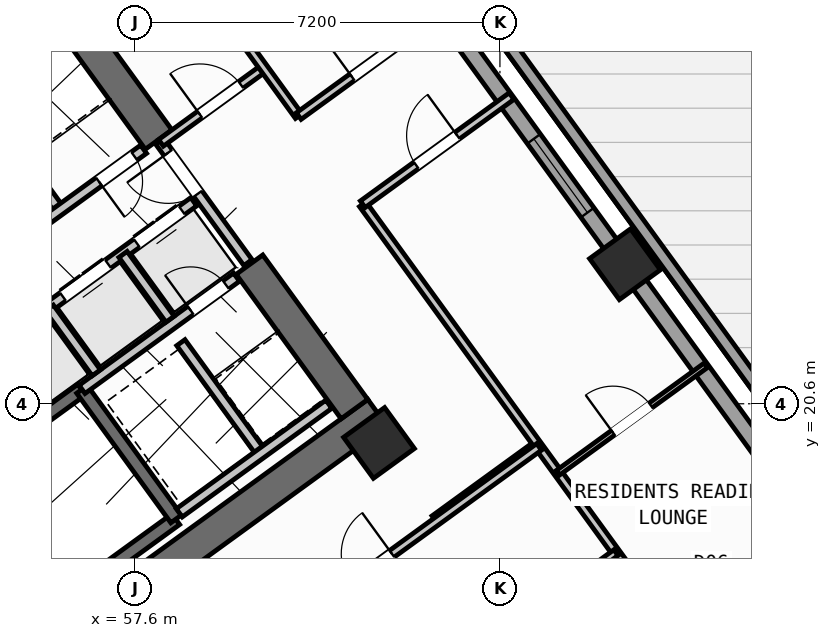
"""IFC4 building model, lengths in metres.
Left out: names, types, materials, properties, quantities, classifications, styles, units other than length and angle.
Written with IfcOpenShell. Run it as: python <this file> out.ifc"""

import sys

from ifc_helpers import new_model, si_unit, direction, frame, frame_2d, origin, origin_2d, place, context, subcontext, project, spatial, rectangle, hollow_rectangle, extrude, source, transform, mapped, element, fill, save


model = new_model("IFC4")
c1 = context("Model", 3, precision=1e-05, world=origin(), true_north=direction((0.0, 1.0)))
c2 = subcontext(c1, "Body", "Model", "MODEL_VIEW")
j1 = project(units=[si_unit("LENGTHUNIT", "METRE"), si_unit("PLANEANGLEUNIT", "RADIAN")], contexts=[c1])
p1 = place(None, origin())
s1 = spatial("IfcSite", under=j1, at=p1, CompositionType="ELEMENT")
p2 = place(p1, origin())
s2 = spatial("IfcBuilding", under=s1, at=p2, CompositionType="ELEMENT")
p3 = place(p2, frame((0.0, 0.0, 24.0)))
s3 = spatial("IfcBuildingStorey", under=s2, at=p3, CompositionType="ELEMENT", Elevation=24.0)
p4 = place(p3, frame((52.318, 13.11, 0.0), z_axis=(0.0, 0.0, 1.0), x_axis=(0.809019445368, 0.587781878776, 0.0)))
e1 = element("IfcWall", 1, at=p4, inside=s3, PredefinedType="SHEAR", context=c2, shape_type="SweptSolid", body=[
    extrude(rectangle(XDim=12.44, YDim=0.65, at=frame_2d((6.22, 0.0))), origin(), (0.0, 0.0, 1.0), 3.35),
])
p5 = place(p3, frame((61.929, 20.494, 0.0), z_axis=(0.0, 0.0, 1.0), x_axis=(-0.58782982593, 0.808984607855, 0.0)))
e2 = element("IfcWall", 2, at=p5, inside=s3, PredefinedType="SHEAR", context=c2, shape_type="SweptSolid", body=[
    extrude(rectangle(XDim=3.525, YDim=0.65, at=frame_2d((1.762, 0.0))), origin(), (0.0, 0.0, 1.0), 3.35),
])
p6 = place(p3, frame((58.064, 25.813, 0.0), z_axis=(0.0, 0.0, 1.0), x_axis=(-0.58777996584, 0.809020835181, 0.0)))
e3 = element("IfcWall", 3, at=p6, inside=s3, PredefinedType="SHEAR", context=c2, shape_type="SweptSolid", body=[
    extrude(rectangle(XDim=6.375, YDim=0.65, at=frame_2d((3.188, 0.0))), origin(), (0.0, 0.0, 1.0), 3.35),
])
m1 = source(origin(), c2, "Body", "SweptSolid", [
    extrude(hollow_rectangle(XDim=1.0, YDim=1.0, WallThickness=0.04, at=origin_2d()), origin(), (0.0, 0.0, 1.0), 3.6),
])
for number, where, z_axis, x_axis in (
    (4, (62.414, 19.827, 0.0), (0.0, 0.0, 1.0), (0.809, 0.588, 0.0)),
    (5, (67.268, 23.354, 0.0), (0.0, 0.0, 1.0), (0.809, 0.588, 0.0)),
):
    element("IfcColumn", number, at=place(p3, frame(where, z_axis=z_axis, x_axis=x_axis)), inside=s3, PredefinedType="COLUMN", context=c2, shape_type="MappedRepresentation", body=[
        mapped(m1, transform((0.0, 0.0, 0.0), scale=1.0)),
    ])
p7 = place(p3, frame((70.18, 20.52, 0.0), z_axis=(0.0, 0.0, 1.0), x_axis=(-0.587784691012, 0.809017402169, 0.0)))
e6 = element("IfcWall", 6, at=p7, inside=s3, PredefinedType="PARAPET", context=c2, shape_type="SweptSolid", body=[
    extrude(rectangle(XDim=18.608, YDim=0.24, at=frame_2d((9.304, 0.0))), origin(), (0.0, 0.0, 1.0), 1.15),
])
p8 = place(p3, frame((43.938, 25.192, 0.0), z_axis=(0.0, 0.0, 1.0), x_axis=(0.809016324578, 0.587786174187, 0.0)))
e7 = element("IfcWall", 7, at=p8, inside=s3, PredefinedType="STANDARD", context=c2, shape_type="SweptSolid", body=[
    extrude(rectangle(XDim=17.587, YDim=0.32, at=frame_2d((8.794, 0.0))), origin(), (0.0, 0.0, 1.0), 3.35),
])
p9 = place(p8, frame((14.914, 0.0, 0.0)))
e8 = element("IfcOpeningElement", 8, at=p9, cuts=e7, PredefinedType="OPENING", context=c2, shape_type="SweptSolid", body=[
    extrude(rectangle(XDim=1.05, YDim=2.15, at=frame_2d((0.525, 1.075))), frame((0.0, 0.17, 0.0), z_axis=(0.0, -1.0, 0.0), x_axis=(1.0, 0.0, 0.0)), (0.0, 0.0, 1.0), 0.34),
])
p10 = place(p8, frame((2.169, 0.0, 0.8)))
e9 = element("IfcOpeningElement", 9, at=p10, cuts=e7, PredefinedType="OPENING", context=c2, shape_type="SweptSolid", body=[
    extrude(rectangle(XDim=2.1, YDim=1.55, at=frame_2d((1.05, 0.775))), frame((0.0, 0.17, 0.0), z_axis=(0.0, -1.0, 0.0), x_axis=(1.0, 0.0, 0.0)), (0.0, 0.0, 1.0), 0.34),
])
p11 = place(p8, frame((7.319, 0.0, 0.8)))
e10 = element("IfcOpeningElement", 10, at=p11, cuts=e7, PredefinedType="OPENING", context=c2, shape_type="SweptSolid", body=[
    extrude(rectangle(XDim=2.1, YDim=1.55, at=frame_2d((1.05, 0.775))), frame((0.0, 0.17, 0.0), z_axis=(0.0, -1.0, 0.0), x_axis=(1.0, 0.0, 0.0)), (0.0, 0.0, 1.0), 0.34),
])
p12 = place(p3, frame((58.455, 35.484, 0.0), z_axis=(0.0, 0.0, 1.0), x_axis=(0.587783625747, -0.809018176127, 0.0)))
e11 = element("IfcWall", 11, at=p12, inside=s3, PredefinedType="STANDARD", context=c2, shape_type="SweptSolid", body=[
    extrude(rectangle(XDim=21.587, YDim=0.32, at=frame_2d((10.794, 0.0))), origin(), (0.0, 0.0, 1.0), 2.725),
])
p13 = place(p12, frame((2.994, 0.0, 0.8)))
e12 = element("IfcOpeningElement", 12, at=p13, cuts=e11, PredefinedType="OPENING", context=c2, shape_type="SweptSolid", body=[
    extrude(rectangle(XDim=2.1, YDim=1.55, at=frame_2d((1.05, 0.775))), frame((0.0, 0.17, 0.0), z_axis=(0.0, -1.0, 0.0), x_axis=(1.0, 0.0, 0.0)), (0.0, 0.0, 1.0), 0.34),
])
p14 = place(p12, frame((11.934, 0.0, 0.85)))
e13 = element("IfcOpeningElement", 13, at=p14, cuts=e11, PredefinedType="OPENING", context=c2, shape_type="SweptSolid", body=[
    extrude(rectangle(XDim=1.8, YDim=1.5, at=frame_2d((0.9, 0.75))), frame((0.0, 0.17, 0.0), z_axis=(0.0, -1.0, 0.0), x_axis=(1.0, 0.0, 0.0)), (0.0, 0.0, 1.0), 0.34),
])
p15 = place(p3, frame((71.098, 17.731, 0.0), z_axis=(0.0, 0.0, 1.0), x_axis=(-0.809021120468, -0.587779573171, 0.0)))
e14 = element("IfcWall", 14, at=p15, inside=s3, PredefinedType="STANDARD", context=c2, shape_type="SweptSolid", body=[
    extrude(rectangle(XDim=17.588, YDim=0.32, at=frame_2d((8.794, 0.0))), origin(), (0.0, 0.0, 1.0), 3.35),
])
p16 = place(p15, frame((1.611, 0.0, 0.0)))
e15 = element("IfcOpeningElement", 15, at=p16, cuts=e14, PredefinedType="OPENING", context=c2, shape_type="SweptSolid", body=[
    extrude(rectangle(XDim=1.05, YDim=2.15, at=frame_2d((0.525, 1.075))), frame((0.0, 0.17, 0.0), z_axis=(0.0, -1.0, 0.0), x_axis=(1.0, 0.0, 0.0)), (0.0, 0.0, 1.0), 0.34),
])
p17 = place(p15, frame((8.606, 0.0, 0.8)))
e16 = element("IfcOpeningElement", 16, at=p17, cuts=e14, PredefinedType="OPENING", context=c2, shape_type="SweptSolid", body=[
    extrude(rectangle(XDim=2.1, YDim=1.55, at=frame_2d((1.05, 0.775))), frame((0.0, 0.17, 0.0), z_axis=(0.0, -1.0, 0.0), x_axis=(1.0, 0.0, 0.0)), (0.0, 0.0, 1.0), 0.34),
])
p18 = place(p15, frame((12.881, 0.0, 0.8)))
e17 = element("IfcOpeningElement", 17, at=p18, cuts=e14, PredefinedType="OPENING", context=c2, shape_type="SweptSolid", body=[
    extrude(rectangle(XDim=2.1, YDim=1.55, at=frame_2d((1.05, 0.775))), frame((0.0, 0.17, 0.0), z_axis=(0.0, -1.0, 0.0), x_axis=(1.0, 0.0, 0.0)), (0.0, 0.0, 1.0), 0.34),
])
p19 = place(p3, frame((49.863, 23.44, 0.0), z_axis=(0.0, 0.0, 1.0), x_axis=(0.809003474932, 0.587803859759, 0.0)))
e18 = element("IfcWall", 18, at=p19, inside=s3, PredefinedType="SHEAR", context=c2, shape_type="SweptSolid", body=[
    extrude(rectangle(XDim=7.46, YDim=0.26, at=frame_2d((3.73, 0.0))), origin(), (0.0, 0.0, 1.0), 3.35),
])
p20 = place(p19, frame((0.36, 0.0, 0.0)))
e19 = element("IfcOpeningElement", 19, at=p20, cuts=e18, PredefinedType="OPENING", context=c2, shape_type="SweptSolid", body=[
    extrude(rectangle(XDim=0.86, YDim=2.05, at=frame_2d((0.43, 1.025))), frame((0.0, 0.14, 0.0), z_axis=(0.0, -1.0, 0.0), x_axis=(1.0, 0.0, 0.0)), (0.0, 0.0, 1.0), 0.28),
])
p21 = place(p3, frame((52.472, 14.013, 0.0), z_axis=(0.0, 0.0, 1.0), x_axis=(0.809028366311, 0.587769599847, 0.0)))
e20 = element("IfcWall", 20, at=p21, inside=s3, PredefinedType="SHEAR", context=c2, shape_type="SweptSolid", body=[
    extrude(rectangle(XDim=7.33, YDim=0.26, at=frame_2d((3.665, 0.0))), origin(), (0.0, 0.0, 1.0), 3.35),
])
p22 = place(p3, frame((50.615, 16.57, 0.0), z_axis=(0.0, 0.0, 1.0), x_axis=(0.809028366311, 0.587769599847, 0.0)))
e21 = element("IfcWall", 21, at=p22, inside=s3, PredefinedType="SHEAR", context=c2, shape_type="SweptSolid", body=[
    extrude(rectangle(XDim=7.33, YDim=0.26, at=frame_2d((3.665, 0.0))), origin(), (0.0, 0.0, 1.0), 3.35),
])
p23 = place(p22, frame((0.22, 0.0, 0.0)))
e22 = element("IfcOpeningElement", 22, at=p23, cuts=e21, PredefinedType="OPENING", context=c2, shape_type="SweptSolid", body=[
    extrude(rectangle(XDim=1.1, YDim=2.1, at=frame_2d((0.55, 1.05))), frame((0.0, 0.14, 0.0), z_axis=(0.0, -1.0, 0.0), x_axis=(1.0, 0.0, 0.0)), (0.0, 0.0, 1.0), 0.28),
])
p24 = place(p3, frame((58.41, 18.327, 0.0), z_axis=(0.0, 0.0, 1.0), x_axis=(-0.58776738483, 0.809029975545, 0.0)))
e23 = element("IfcWall", 23, at=p24, inside=s3, PredefinedType="SHEAR", context=c2, shape_type="SweptSolid", body=[
    extrude(rectangle(XDim=3.16, YDim=0.26, at=frame_2d((1.58, 0.0))), origin(), (0.0, 0.0, 1.0), 3.35),
])
p25 = place(p3, frame((56.553, 20.884, 0.0), z_axis=(0.0, 0.0, 1.0), x_axis=(0.809035789462, 0.587759382205, 0.0)))
e24 = element("IfcWall", 24, at=p25, inside=s3, PredefinedType="STANDARD", context=c2, shape_type="SweptSolid", body=[
    extrude(rectangle(XDim=3.768, YDim=0.2, at=frame_2d((1.884, 0.0))), origin(), (0.0, 0.0, 1.0), 3.34),
])
p26 = place(p25, frame((2.65, 0.0, 0.0)))
e25 = element("IfcOpeningElement", 25, at=p26, cuts=e24, PredefinedType="OPENING", context=c2, shape_type="SweptSolid", body=[
    extrude(rectangle(XDim=0.86, YDim=2.05, at=frame_2d((0.43, 1.025))), frame((0.0, 0.11, 0.0), z_axis=(0.0, -1.0, 0.0), x_axis=(1.0, 0.0, 0.0)), (0.0, 0.0, 1.0), 0.22),
])
p27 = place(p3, frame((54.421, 21.436, 0.0), z_axis=(0.0, 0.0, 1.0), x_axis=(0.809013710463, 0.587789772183, 0.0)))
e26 = element("IfcWall", 26, at=p27, inside=s3, PredefinedType="STANDARD", context=c2, shape_type="SweptSolid", body=[
    extrude(rectangle(XDim=5.36, YDim=0.2, at=frame_2d((2.68, 0.0))), origin(), (0.0, 0.0, 1.0), 3.34),
])
p28 = place(p27, frame((0.37, 0.0, 0.0)))
e27 = element("IfcOpeningElement", 27, at=p28, cuts=e26, PredefinedType="OPENING", context=c2, shape_type="SweptSolid", body=[
    extrude(rectangle(XDim=1.1, YDim=2.15, at=frame_2d((0.55, 1.075))), frame((0.0, 0.11, 0.0), z_axis=(0.0, -1.0, 0.0), x_axis=(1.0, 0.0, 0.0)), (0.0, 0.0, 1.0), 0.22),
])
p29 = place(p27, frame((2.17, 0.0, 0.0)))
e28 = element("IfcOpeningElement", 28, at=p29, cuts=e26, PredefinedType="OPENING", context=c2, shape_type="SweptSolid", body=[
    extrude(rectangle(XDim=1.1, YDim=2.15, at=frame_2d((0.55, 1.075))), frame((0.0, 0.11, 0.0), z_axis=(0.0, -1.0, 0.0), x_axis=(1.0, 0.0, 0.0)), (0.0, 0.0, 1.0), 0.22),
])
p30 = place(p27, frame((3.97, 0.0, 0.0)))
e29 = element("IfcOpeningElement", 29, at=p30, cuts=e26, PredefinedType="OPENING", context=c2, shape_type="SweptSolid", body=[
    extrude(rectangle(XDim=1.1, YDim=2.15, at=frame_2d((0.55, 1.075))), frame((0.0, 0.11, 0.0), z_axis=(0.0, -1.0, 0.0), x_axis=(1.0, 0.0, 0.0)), (0.0, 0.0, 1.0), 0.22),
])
p31 = place(p3, frame((56.834, 21.212, 0.0), z_axis=(0.0, 0.0, 1.0), x_axis=(-0.58776738483, 0.809029975545, 0.0)))
e30 = element("IfcWall", 30, at=p31, inside=s3, PredefinedType="STANDARD", context=c2, shape_type="SweptSolid", body=[
    extrude(rectangle(XDim=1.58, YDim=0.2, at=frame_2d((0.79, 0.0))), origin(), (0.0, 0.0, 1.0), 3.34),
])
p32 = place(p3, frame((58.29, 22.27, 0.0), z_axis=(0.0, 0.0, 1.0), x_axis=(-0.587840865826, 0.808976585857, 0.0)))
e31 = element("IfcWall", 31, at=p32, inside=s3, PredefinedType="STANDARD", context=c2, shape_type="SweptSolid", body=[
    extrude(rectangle(XDim=1.58, YDim=0.2, at=frame_2d((0.79, 0.0))), origin(), (0.0, 0.0, 1.0), 3.34),
])
p33 = place(p3, frame((60.067, 19.655, 0.0), z_axis=(0.0, 0.0, 1.0), x_axis=(-0.587800520745, 0.809005900975, 0.0)))
e32 = element("IfcWall", 32, at=p33, inside=s3, PredefinedType="STANDARD", context=c2, shape_type="SweptSolid", body=[
    extrude(rectangle(XDim=2.66, YDim=0.2, at=frame_2d((1.33, 0.0))), origin(), (0.0, 0.0, 1.0), 3.34),
])
p34 = place(p3, frame((58.472, 18.447, 0.0), z_axis=(0.0, 0.0, 1.0), x_axis=(0.809022487728, 0.587777691266, 0.0)))
e33 = element("IfcWall", 33, at=p34, inside=s3, PredefinedType="STANDARD", context=c2, shape_type="SweptSolid", body=[
    extrude(rectangle(XDim=3.648, YDim=0.2, at=frame_2d((1.824, 0.0))), origin(), (0.0, 0.0, 1.0), 3.34),
])
p35 = place(p3, frame((56.111, 24.419, 0.0), z_axis=(0.0, 0.0, 1.0), x_axis=(-0.58777848983, 0.809021907548, 0.0)))
e34 = element("IfcWall", 34, at=p35, inside=s3, PredefinedType="STANDARD", context=c2, shape_type="SweptSolid", body=[
    extrude(rectangle(XDim=2.88, YDim=0.2, at=frame_2d((1.44, 0.0))), origin(), (0.0, 0.0, 1.0), 3.34),
])
p36 = place(p3, frame((53.425, 22.468, 0.0), z_axis=(0.0, 0.0, 1.0), x_axis=(0.80902705128, 0.587771409902, 0.0)))
e35 = element("IfcWall", 35, at=p36, inside=s3, PredefinedType="STANDARD", context=c2, shape_type="SweptSolid", body=[
    extrude(rectangle(XDim=5.368, YDim=0.2, at=frame_2d((2.684, 0.0))), origin(), (0.0, 0.0, 1.0), 3.34),
])
p37 = place(p36, frame((4.28, 0.0, 0.0)))
e36 = element("IfcOpeningElement", 36, at=p37, cuts=e35, PredefinedType="OPENING", context=c2, shape_type="SweptSolid", body=[
    extrude(rectangle(XDim=0.86, YDim=2.05, at=frame_2d((0.43, 1.025))), frame((0.0, 0.11, 0.0), z_axis=(0.0, -1.0, 0.0), x_axis=(1.0, 0.0, 0.0)), (0.0, 0.0, 1.0), 0.22),
])
p38 = place(p36, frame((1.45, 0.0, 0.0)))
e37 = element("IfcOpeningElement", 37, at=p38, cuts=e35, PredefinedType="OPENING", context=c2, shape_type="SweptSolid", body=[
    extrude(rectangle(XDim=0.86, YDim=2.05, at=frame_2d((0.43, 1.025))), frame((0.0, 0.11, 0.0), z_axis=(0.0, -1.0, 0.0), x_axis=(1.0, 0.0, 0.0)), (0.0, 0.0, 1.0), 0.22),
])
p39 = place(p3, frame((59.827, 23.386, 0.0), z_axis=(0.0, 0.0, 1.0), x_axis=(-0.587803840107, 0.809003489211, 0.0)))
e38 = element("IfcWall", 38, at=p39, inside=s3, PredefinedType="STANDARD", context=c2, shape_type="SweptSolid", body=[
    extrude(rectangle(XDim=2.96, YDim=0.2, at=frame_2d((1.48, 0.0))), origin(), (0.0, 0.0, 1.0), 3.34),
])
p40 = place(p39, frame((1.68, 0.0, 0.0)))
e39 = element("IfcOpeningElement", 39, at=p40, cuts=e38, PredefinedType="OPENING", context=c2, shape_type="SweptSolid", body=[
    extrude(rectangle(XDim=1.0, YDim=2.1, at=frame_2d((0.5, 1.05))), frame((0.0, 0.11, 0.0), z_axis=(0.0, -1.0, 0.0), x_axis=(1.0, 0.0, 0.0)), (0.0, 0.0, 1.0), 0.22),
])
p41 = place(p3, frame((63.507, 18.322, 0.0), z_axis=(0.0, 0.0, 1.0), x_axis=(0.809034604122, 0.587761013791, 0.0)))
e40 = element("IfcWall", 40, at=p41, inside=s3, PredefinedType="PARTITIONING", context=c2, shape_type="SweptSolid", body=[
    extrude(rectangle(XDim=2.51, YDim=0.16, at=frame_2d((1.255, 0.0))), origin(), (0.0, 0.0, 1.0), 3.34),
])
p42 = place(p3, frame((58.111, 25.749, 0.0), z_axis=(0.0, 0.0, 1.0), x_axis=(0.809000999347, 0.58780726693, 0.0)))
e41 = element("IfcWall", 41, at=p42, inside=s3, PredefinedType="PARTITIONING", context=c2, shape_type="SweptSolid", body=[
    extrude(rectangle(XDim=2.51, YDim=0.16, at=frame_2d((1.255, 0.0))), origin(), (0.0, 0.0, 1.0), 2.725),
])
p43 = place(p42, frame((0.95, 0.0, 0.0)))
e42 = element("IfcOpeningElement", 42, at=p43, cuts=e41, PredefinedType="OPENING", context=c2, shape_type="SweptSolid", body=[
    extrude(rectangle(XDim=1.0, YDim=2.1, at=frame_2d((0.5, 1.05))), frame((0.0, 0.09, 0.0), z_axis=(0.0, -1.0, 0.0), x_axis=(1.0, 0.0, 0.0)), (0.0, 0.0, 1.0), 0.18),
])
p44 = place(p3, frame((68.353, 15.922, 0.0), z_axis=(0.0, 0.0, 1.0), x_axis=(-0.587783168305, 0.809018508476, 0.0)))
e43 = element("IfcWall", 43, at=p44, inside=s3, PredefinedType="PARTITIONING", context=c2, shape_type="SweptSolid", body=[
    extrude(rectangle(XDim=10.65, YDim=0.16, at=frame_2d((5.325, 0.0))), origin(), (0.0, 0.0, 1.0), 3.34),
])
p45 = place(p3, frame((60.829, 26.278, 0.0), z_axis=(0.0, 0.0, 1.0), x_axis=(-0.587781800813, 0.80901950201, 0.0)))
e44 = element("IfcWall", 44, at=p45, inside=s3, PredefinedType="PARTITIONING", context=c2, shape_type="SweptSolid", body=[
    extrude(rectangle(XDim=8.9, YDim=0.16, at=frame_2d((4.45, 0.0))), origin(), (0.0, 0.0, 1.0), 3.34),
])
p46 = place(p3, frame((62.093, 24.538, 0.0), z_axis=(0.0, 0.0, 1.0), x_axis=(0.809035546126, 0.58775971715, 0.0)))
e45 = element("IfcWall", 45, at=p46, inside=s3, PredefinedType="PARTITIONING", context=c2, shape_type="SweptSolid", body=[
    extrude(rectangle(XDim=3.63, YDim=0.16, at=frame_2d((1.815, 0.0))), origin(), (0.0, 0.0, 1.0), 3.34),
])
p47 = place(p46, frame((1.305, 0.0, 0.0)))
e46 = element("IfcOpeningElement", 46, at=p47, cuts=e45, PredefinedType="OPENING", context=c2, shape_type="SweptSolid", body=[
    extrude(rectangle(XDim=1.0, YDim=2.1, at=frame_2d((0.5, 1.05))), frame((0.0, 0.09, 0.0), z_axis=(0.0, -1.0, 0.0), x_axis=(1.0, 0.0, 0.0)), (0.0, 0.0, 1.0), 0.18),
])
p48 = place(p3, frame((60.829, 26.278, 0.0), z_axis=(0.0, 0.0, 1.0), x_axis=(0.809003564202, 0.587803736896, 0.0)))
e47 = element("IfcWall", 47, at=p48, inside=s3, PredefinedType="PARTITIONING", context=c2, shape_type="SweptSolid", body=[
    extrude(rectangle(XDim=3.63, YDim=0.16, at=frame_2d((1.815, 0.0))), origin(), (0.0, 0.0, 1.0), 3.34),
])
p49 = place(p48, frame((1.305, 0.0, 0.0)))
e48 = element("IfcOpeningElement", 48, at=p49, cuts=e47, PredefinedType="OPENING", context=c2, shape_type="SweptSolid", body=[
    extrude(rectangle(XDim=1.0, YDim=2.1, at=frame_2d((0.5, 1.05))), frame((0.0, 0.09, 0.0), z_axis=(0.0, -1.0, 0.0), x_axis=(1.0, 0.0, 0.0)), (0.0, 0.0, 1.0), 0.18),
])
p50 = place(p3, frame((65.944, 19.238, 0.0), z_axis=(0.0, 0.0, 1.0), x_axis=(0.809013833588, 0.587789602718, 0.0)))
e49 = element("IfcWall", 49, at=p50, inside=s3, PredefinedType="PARTITIONING", context=c2, shape_type="SweptSolid", body=[
    extrude(rectangle(XDim=3.61, YDim=0.11, at=frame_2d((1.805, 0.0))), origin(), (0.0, 0.0, 1.0), 3.34),
])
p51 = place(p50, frame((1.345, 0.0, 0.0)))
e50 = element("IfcOpeningElement", 50, at=p51, cuts=e49, PredefinedType="OPENING", context=c2, shape_type="SweptSolid", body=[
    extrude(rectangle(XDim=0.92, YDim=2.08, at=frame_2d((0.46, 1.04))), frame((0.0, 0.065, 0.0), z_axis=(0.0, -1.0, 0.0), x_axis=(1.0, 0.0, 0.0)), (0.0, 0.0, 1.0), 0.13),
])
p52 = place(p3, frame((53.705, 11.126, 0.0), z_axis=(0.0, 0.0, 1.0), x_axis=(0.809014504436, 0.587788679384, 0.0)))
e51 = element("IfcWall", 51, at=p52, inside=s3, PredefinedType="PARTITIONING", context=c2, shape_type="SweptSolid", body=[
    extrude(rectangle(XDim=14.67, YDim=0.16, at=frame_2d((7.335, 0.0))), origin(), (0.0, 0.0, 1.0), 3.34),
])
p53 = place(p52, frame((10.08, 0.0, 0.0)))
e52 = element("IfcOpeningElement", 52, at=p53, cuts=e51, PredefinedType="OPENING", context=c2, shape_type="SweptSolid", body=[
    extrude(rectangle(XDim=1.0, YDim=2.1, at=frame_2d((0.5, 1.05))), frame((0.0, 0.09, 0.0), z_axis=(0.0, -1.0, 0.0), x_axis=(1.0, 0.0, 0.0)), (0.0, 0.0, 1.0), 0.18),
])
p54 = place(p3, frame((56.249, 9.785, 0.0), z_axis=(0.0, 0.0, 1.0), x_axis=(0.809011747655, 0.587792473715, 0.0)))
e53 = element("IfcWall", 53, at=p54, inside=s3, PredefinedType="PLUMBINGWALL", context=c2, shape_type="SweptSolid", body=[
    extrude(rectangle(XDim=13.4, YDim=0.14, at=frame_2d((6.7, 0.0))), origin(), (0.0, 0.0, 1.0), 3.34),
])
p55 = place(p54, frame((8.82, 0.0, 0.0)))
e54 = element("IfcOpeningElement", 54, at=p55, cuts=e53, PredefinedType="OPENING", context=c2, shape_type="SweptSolid", body=[
    extrude(rectangle(XDim=0.92, YDim=2.08, at=frame_2d((0.46, 1.04))), frame((0.0, 0.08, 0.0), z_axis=(0.0, -1.0, 0.0), x_axis=(1.0, 0.0, 0.0)), (0.0, 0.0, 1.0), 0.16),
])
m2 = source(origin(), c2, "Body", "SweptSolid", [
    extrude(rectangle(XDim=1.8, YDim=1.5, at=frame_2d((0.9, 0.75))), frame((0.0, 0.03, 0.0), z_axis=(0.0, -1.0, 0.0), x_axis=(1.0, 0.0, 0.0)), (0.0, 0.0, 1.0), 0.06),
])
p56 = place(p14, origin())
e55 = element("IfcWindow", 55, at=p56, inside=s3, PartitioningType="SINGLE_PANEL", PredefinedType="WINDOW", context=c2, shape_type="MappedRepresentation", body=[
    mapped(m2, transform((0.0, 0.0, 0.0), scale=1.0)),
])
fill(e13, e55)
m3 = source(origin(), c2, "Body", "SweptSolid", [
    extrude(rectangle(XDim=1.1, YDim=2.15, at=frame_2d((0.55, 1.075))), frame((0.0, 0.025, 0.0), z_axis=(0.0, -1.0, 0.0), x_axis=(1.0, 0.0, 0.0)), (0.0, 0.0, 1.0), 0.05),
])
p57 = place(p29, origin())
e56 = element("IfcDoor", 56, at=p57, inside=s3, OperationType="DOUBLE_DOOR_SLIDING", PredefinedType="DOOR", context=c2, shape_type="MappedRepresentation", body=[
    mapped(m3, transform((0.0, 0.0, 0.0), scale=1.0)),
])
fill(e28, e56)
p58 = place(p30, origin())
e57 = element("IfcDoor", 57, at=p58, inside=s3, OperationType="DOUBLE_DOOR_SLIDING", PredefinedType="DOOR", context=c2, shape_type="MappedRepresentation", body=[
    mapped(m3, transform((0.0, 0.0, 0.0), scale=1.0)),
])
fill(e29, e57)
m4 = source(origin(), c2, "Body", "SweptSolid", [
    extrude(rectangle(XDim=0.86, YDim=2.05, at=frame_2d((0.43, 1.025))), frame((0.0, 0.025, 0.0), z_axis=(0.0, -1.0, 0.0), x_axis=(1.0, 0.0, 0.0)), (0.0, 0.0, 1.0), 0.05),
])
p59 = place(p26, origin())
e58 = element("IfcDoor", 58, at=p59, inside=s3, OperationType="SINGLE_SWING_LEFT", PredefinedType="DOOR", context=c2, shape_type="MappedRepresentation", body=[
    mapped(m4, transform((0.0, 0.0, 0.0), scale=1.0)),
])
fill(e25, e58)
p60 = place(p37, frame((0.86, 0.0, 0.0), z_axis=(0.0, 0.0, 1.0), x_axis=(-1.0, 0.0, 0.0)))
e59 = element("IfcDoor", 59, at=p60, inside=s3, OperationType="SINGLE_SWING_RIGHT", PredefinedType="DOOR", context=c2, shape_type="MappedRepresentation", body=[
    mapped(m4, transform((0.0, 0.0, 0.0), scale=1.0)),
])
fill(e36, e59)
m5 = source(origin(), c2, "Body", "SweptSolid", [
    extrude(rectangle(XDim=1.0, YDim=2.1, at=frame_2d((0.5, 1.05))), frame((0.0, 0.025, 0.0), z_axis=(0.0, -1.0, 0.0), x_axis=(1.0, 0.0, 0.0)), (0.0, 0.0, 1.0), 0.05),
])
p61 = place(p43, origin())
e60 = element("IfcDoor", 60, at=p61, inside=s3, OperationType="SINGLE_SWING_LEFT", PredefinedType="DOOR", context=c2, shape_type="MappedRepresentation", body=[
    mapped(m5, transform((0.0, 0.0, 0.0), scale=1.0)),
])
fill(e42, e60)
p62 = place(p40, origin())
e61 = element("IfcDoor", 61, at=p62, inside=s3, OperationType="SINGLE_SWING_RIGHT", PredefinedType="DOOR", context=c2, shape_type="MappedRepresentation", body=[
    mapped(m5, transform((0.0, 0.0, 0.0), scale=1.0)),
])
fill(e39, e61)
p63 = place(p49, origin())
e62 = element("IfcDoor", 62, at=p63, inside=s3, OperationType="SINGLE_SWING_LEFT", PredefinedType="DOOR", context=c2, shape_type="MappedRepresentation", body=[
    mapped(m5, transform((0.0, 0.0, 0.0), scale=1.0)),
])
fill(e48, e62)
p64 = place(p47, origin())
e63 = element("IfcDoor", 63, at=p64, inside=s3, OperationType="SINGLE_SWING_RIGHT", PredefinedType="DOOR", context=c2, shape_type="MappedRepresentation", body=[
    mapped(m5, transform((0.0, 0.0, 0.0), scale=1.0)),
])
fill(e46, e63)
m6 = source(origin(), c2, "Body", "SweptSolid", [
    extrude(rectangle(XDim=0.92, YDim=2.08, at=frame_2d((0.46, 1.04))), frame((0.0, 0.025, 0.0), z_axis=(0.0, -1.0, 0.0), x_axis=(1.0, 0.0, 0.0)), (0.0, 0.0, 1.0), 0.05),
])
p65 = place(p51, origin())
e64 = element("IfcDoor", 64, at=p65, inside=s3, OperationType="SINGLE_SWING_LEFT", PredefinedType="DOOR", context=c2, shape_type="MappedRepresentation", body=[
    mapped(m6, transform((0.0, 0.0, 0.0), scale=1.0)),
])
fill(e50, e64)
p66 = place(p53, origin())
e65 = element("IfcDoor", 65, at=p66, inside=s3, OperationType="SINGLE_SWING_RIGHT", PredefinedType="DOOR", context=c2, shape_type="MappedRepresentation", body=[
    mapped(m5, transform((0.0, 0.0, 0.0), scale=1.0)),
])
fill(e52, e65)
save(model, sys.argv[1])
